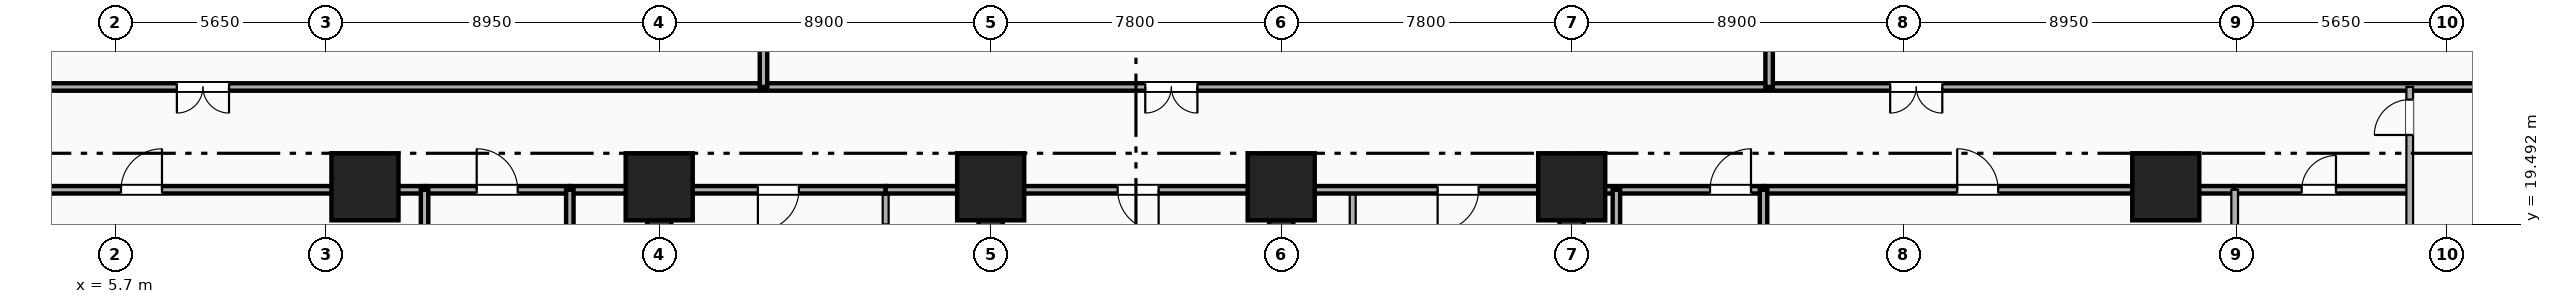
"""IFC4 building model, lengths in metres.
Left out: names, types, materials, properties, quantities, classifications, styles, units other than length and angle.
Written with IfcOpenShell. Run it as: python <this file> out.ifc"""

import sys

from ifc_helpers import new_model, si_unit, direction, frame, frame_2d, origin, origin_2d, place, context, subcontext, project, spatial, rectangle, extrude, element, fill, save


model = new_model("IFC4")
c1 = context("Model", 3, precision=1e-05, world=origin(), true_north=direction((0.0, 1.0)))
c2 = subcontext(c1, "Body", "Model", "MODEL_VIEW")
j1 = project(units=[si_unit("LENGTHUNIT", "METRE"), si_unit("PLANEANGLEUNIT", "RADIAN")], contexts=[c1])
p1 = place(None, origin())
s1 = spatial("IfcSite", under=j1, at=p1, CompositionType="ELEMENT")
p2 = place(p1, origin())
s2 = spatial("IfcBuilding", under=s1, at=p2, CompositionType="ELEMENT")
p3 = place(p2, frame((0.0, 0.0, -5.4)))
s3 = spatial("IfcBuildingStorey", under=s2, at=p3, CompositionType="ELEMENT", Elevation=-5.4)
for number, where, z_axis, x_axis in (
    (1, (20.3, 3.5, 0.0), (0.0, 0.0, 1.0), (0.0, 1.0, 0.0)),
    (2, (44.8, 3.5, 0.0), (0.0, 0.0, 1.0), (0.0, 1.0, 0.0)),
):
    element("IfcWall", number, at=place(p3, frame(where, z_axis=z_axis, x_axis=x_axis)), inside=s3, PredefinedType="SHEAR", context=c2, shape_type="SweptSolid", body=[
        extrude(rectangle(XDim=16.9, YDim=0.65, at=frame_2d((8.45, 0.0))), origin(), (0.0, 0.0, 1.0), 5.05),
    ])
p4 = place(p3, frame((29.2, 3.5, 0.0), z_axis=(0.0, 0.0, 1.0), x_axis=(0.0, 1.0, 0.0)))
e3 = element("IfcWall", 3, at=p4, inside=s3, PredefinedType="SHEAR", context=c2, shape_type="SweptSolid", body=[
    extrude(rectangle(XDim=16.9, YDim=0.65, at=frame_2d((8.45, 0.0))), origin(), (0.0, 0.0, 1.0), 5.05),
])
p5 = place(p4, frame((7.75, 0.0, 0.0), z_axis=(0.0, 0.0, 1.0), x_axis=(-1.0, 0.0, 0.0)))
e4 = element("IfcOpeningElement", 4, at=p5, cuts=e3, PredefinedType="OPENING", context=c2, shape_type="SweptSolid", body=[
    extrude(rectangle(XDim=1.1, YDim=2.15, at=frame_2d((0.55, 1.075))), frame((0.0, 0.335, 0.0), z_axis=(0.0, -1.0, 0.0), x_axis=(1.0, 0.0, 0.0)), (0.0, 0.0, 1.0), 0.67),
])
p6 = place(p3, frame((37.0, 3.5, 0.0), z_axis=(0.0, 0.0, 1.0), x_axis=(0.0, 1.0, 0.0)))
e5 = element("IfcWall", 5, at=p6, inside=s3, PredefinedType="SHEAR", context=c2, shape_type="SweptSolid", body=[
    extrude(rectangle(XDim=16.9, YDim=0.65, at=frame_2d((8.45, 0.0))), origin(), (0.0, 0.0, 1.0), 5.05),
])
p7 = place(p6, frame((6.65, 0.0, 0.0)))
e6 = element("IfcOpeningElement", 6, at=p7, cuts=e5, PredefinedType="OPENING", context=c2, shape_type="SweptSolid", body=[
    extrude(rectangle(XDim=1.1, YDim=2.15, at=frame_2d((0.55, 1.075))), frame((0.0, 0.335, 0.0), z_axis=(0.0, -1.0, 0.0), x_axis=(1.0, 0.0, 0.0)), (0.0, 0.0, 1.0), 0.67),
])
for number, where, z_axis, x_axis in (
    (7, (20.3, 20.5, 0.0), (0.0, 0.0, 1.0), (1.0, 0.0, 0.0)),
    (8, (29.2, 20.5, 0.0), (0.0, 0.0, 1.0), (1.0, 0.0, 0.0)),
    (9, (37.0, 20.5, 0.0), (0.0, 0.0, 1.0), (1.0, 0.0, 0.0)),
    (10, (44.8, 20.5, 0.0), (0.0, 0.0, 1.0), (1.0, 0.0, 0.0)),
    (11, (12.4, 20.5, 0.0), (0.0, 0.0, 1.0), (1.0, 0.0, 0.0)),
    (12, (60.75, 20.5, 0.0), (0.0, 0.0, 1.0), (1.0, 0.0, 0.0)),
):
    element("IfcColumn", number, at=place(p3, frame(where, z_axis=z_axis, x_axis=x_axis)), inside=s3, PredefinedType="COLUMN", context=c2, shape_type="SweptSolid", body=[
        extrude(rectangle(XDim=1.8, YDim=1.8, at=origin_2d()), origin(), (0.0, 0.0, 1.0), 5.05),
    ])
p8 = place(p3, frame((26.38, 17.76, 0.0), z_axis=(0.0, 0.0, 1.0), x_axis=(0.0, 1.0, 0.0)))
e13 = element("IfcWall", 13, at=p8, inside=s3, PredefinedType="PARTITIONING", context=c2, shape_type="SweptSolid", body=[
    extrude(rectangle(XDim=2.66, YDim=0.16, at=frame_2d((1.33, 0.0))), origin(), (0.0, 0.0, 1.0), 4.114),
])
p9 = place(p8, frame((0.85, 0.0, 0.0)))
e14 = element("IfcOpeningElement", 14, at=p9, cuts=e13, PredefinedType="OPENING", context=c2, shape_type="SweptSolid", body=[
    extrude(rectangle(XDim=0.88, YDim=2.08, at=frame_2d((0.44, 1.04))), frame((0.0, 0.09, 0.0), z_axis=(0.0, -1.0, 0.0), x_axis=(1.0, 0.0, 0.0)), (0.0, 0.0, 1.0), 0.18),
])
p10 = place(p3, frame((38.92, 17.76, 0.0), z_axis=(0.0, 0.0, 1.0), x_axis=(0.0, 1.0, 0.0)))
e15 = element("IfcWall", 15, at=p10, inside=s3, PredefinedType="PARTITIONING", context=c2, shape_type="SweptSolid", body=[
    extrude(rectangle(XDim=2.66, YDim=0.16, at=frame_2d((1.33, 0.0))), origin(), (0.0, 0.0, 1.0), 4.114),
])
p11 = place(p10, frame((1.14, 0.0, 0.0), z_axis=(0.0, 0.0, 1.0), x_axis=(-1.0, 0.0, 0.0)))
e16 = element("IfcOpeningElement", 16, at=p11, cuts=e15, PredefinedType="OPENING", context=c2, shape_type="SweptSolid", body=[
    extrude(rectangle(XDim=0.92, YDim=2.08, at=frame_2d((0.46, 1.04))), frame((0.0, 0.09, 0.0), z_axis=(0.0, -1.0, 0.0), x_axis=(1.0, 0.0, 0.0)), (0.0, 0.0, 1.0), 0.18),
])
p12 = place(p3, frame((20.65, 20.42, 0.0), z_axis=(0.0, 0.0, 1.0), x_axis=(1.0, 0.0, 0.0)))
e17 = element("IfcWall", 17, at=p12, inside=s3, PredefinedType="PARTITIONING", context=c2, shape_type="SweptSolid", body=[
    extrude(rectangle(XDim=5.73, YDim=0.2, at=frame_2d((2.865, 0.0))), origin(), (0.0, 0.0, 1.0), 4.114),
])
p13 = place(p12, frame((2.3, 0.0, 0.0)))
e18 = element("IfcOpeningElement", 18, at=p13, cuts=e17, PredefinedType="OPENING", context=c2, shape_type="SweptSolid", body=[
    extrude(rectangle(XDim=1.1, YDim=2.15, at=frame_2d((0.55, 1.075))), frame((0.0, 0.11, 0.0), z_axis=(0.0, -1.0, 0.0), x_axis=(1.0, 0.0, 0.0)), (0.0, 0.0, 1.0), 0.22),
])
p14 = place(p3, frame((26.38, 20.42, 0.0), z_axis=(0.0, 0.0, 1.0), x_axis=(1.0, 0.0, 0.0)))
e19 = element("IfcWall", 19, at=p14, inside=s3, PredefinedType="PARTITIONING", context=c2, shape_type="SweptSolid", body=[
    extrude(rectangle(XDim=2.82, YDim=0.2, at=frame_2d((1.41, 0.0))), origin(), (0.0, 0.0, 1.0), 4.114),
])
p15 = place(p3, frame((29.2, 20.42, 0.0), z_axis=(0.0, 0.0, 1.0), x_axis=(1.0, 0.0, 0.0)))
e20 = element("IfcWall", 20, at=p15, inside=s3, PredefinedType="PARTITIONING", context=c2, shape_type="SweptSolid", body=[
    extrude(rectangle(XDim=7.8, YDim=0.2, at=frame_2d((3.9, 0.0))), origin(), (0.0, 0.0, 1.0), 4.114),
])
p16 = place(p15, frame((3.409, 0.0, 0.0)))
e21 = element("IfcOpeningElement", 21, at=p16, cuts=e20, PredefinedType="OPENING", context=c2, shape_type="SweptSolid", body=[
    extrude(rectangle(XDim=1.1, YDim=2.15, at=frame_2d((0.55, 1.075))), frame((0.0, 0.11, 0.0), z_axis=(0.0, -1.0, 0.0), x_axis=(1.0, 0.0, 0.0)), (0.0, 0.0, 1.0), 0.22),
])
p17 = place(p3, frame((37.0, 20.42, 0.0), z_axis=(0.0, 0.0, 1.0), x_axis=(1.0, 0.0, 0.0)))
e22 = element("IfcWall", 22, at=p17, inside=s3, PredefinedType="PARTITIONING", context=c2, shape_type="SweptSolid", body=[
    extrude(rectangle(XDim=7.45, YDim=0.2, at=frame_2d((3.725, 0.0))), origin(), (0.0, 0.0, 1.0), 4.114),
])
p18 = place(p17, frame((4.2, 0.0, 0.0)))
e23 = element("IfcOpeningElement", 23, at=p18, cuts=e22, PredefinedType="OPENING", context=c2, shape_type="SweptSolid", body=[
    extrude(rectangle(XDim=1.1, YDim=2.15, at=frame_2d((0.55, 1.075))), frame((0.0, 0.11, 0.0), z_axis=(0.0, -1.0, 0.0), x_axis=(1.0, 0.0, 0.0)), (0.0, 0.0, 1.0), 0.22),
])
p19 = place(p3, frame((-4.65, 23.18, 0.0), z_axis=(0.0, 0.0, 1.0), x_axis=(1.0, 0.0, 0.0)))
e24 = element("IfcWall", 24, at=p19, inside=s3, PredefinedType="PARTITIONING", context=c2, shape_type="SweptSolid", body=[
    extrude(rectangle(XDim=82.95, YDim=0.2, at=frame_2d((41.475, 0.0))), origin(), (0.0, 0.0, 1.0), 4.18),
])
p20 = place(p19, frame((12.0, 0.0, 0.0)))
e25 = element("IfcOpeningElement", 25, at=p20, cuts=e24, PredefinedType="OPENING", context=c2, shape_type="SweptSolid", body=[
    extrude(rectangle(XDim=1.4, YDim=2.2, at=frame_2d((0.7, 1.1))), frame((0.0, 0.11, 0.0), z_axis=(0.0, -1.0, 0.0), x_axis=(1.0, 0.0, 0.0)), (0.0, 0.0, 1.0), 0.22),
])
p21 = place(p19, frame((38.0, 0.0, 0.0)))
e26 = element("IfcOpeningElement", 26, at=p21, cuts=e24, PredefinedType="OPENING", context=c2, shape_type="SweptSolid", body=[
    extrude(rectangle(XDim=1.4, YDim=2.2, at=frame_2d((0.7, 1.1))), frame((0.0, 0.11, 0.0), z_axis=(0.0, -1.0, 0.0), x_axis=(1.0, 0.0, 0.0)), (0.0, 0.0, 1.0), 0.22),
])
p22 = place(p19, frame((58.0, 0.0, 0.0)))
e27 = element("IfcOpeningElement", 27, at=p22, cuts=e24, PredefinedType="OPENING", context=c2, shape_type="SweptSolid", body=[
    extrude(rectangle(XDim=1.4, YDim=2.2, at=frame_2d((0.7, 1.1))), frame((0.0, 0.11, 0.0), z_axis=(0.0, -1.0, 0.0), x_axis=(1.0, 0.0, 0.0)), (0.0, 0.0, 1.0), 0.22),
])
p23 = place(p3, frame((-4.65, 20.42, 0.0), z_axis=(0.0, 0.0, 1.0), x_axis=(1.0, 0.0, 0.0)))
e28 = element("IfcWall", 28, at=p23, inside=s3, PredefinedType="PARTITIONING", context=c2, shape_type="SweptSolid", body=[
    extrude(rectangle(XDim=18.65, YDim=0.2, at=frame_2d((9.325, 0.0))), origin(), (0.0, 0.0, 1.0), 4.114),
])
p24 = place(p23, frame((11.6, 0.0, 0.0), z_axis=(0.0, 0.0, 1.0), x_axis=(-1.0, 0.0, 0.0)))
e29 = element("IfcOpeningElement", 29, at=p24, cuts=e28, PredefinedType="OPENING", context=c2, shape_type="SweptSolid", body=[
    extrude(rectangle(XDim=1.1, YDim=2.15, at=frame_2d((0.55, 1.075))), frame((0.0, 0.11, 0.0), z_axis=(0.0, -1.0, 0.0), x_axis=(1.0, 0.0, 0.0)), (0.0, 0.0, 1.0), 0.22),
])
p25 = place(p3, frame((14.0, 20.42, 0.0), z_axis=(0.0, 0.0, 1.0), x_axis=(1.0, 0.0, 0.0)))
e30 = element("IfcWall", 30, at=p25, inside=s3, PredefinedType="PARTITIONING", context=c2, shape_type="SweptSolid", body=[
    extrude(rectangle(XDim=3.9, YDim=0.2, at=frame_2d((1.95, 0.0))), origin(), (0.0, 0.0, 1.0), 4.114),
])
p26 = place(p25, frame((2.5, 0.0, 0.0), z_axis=(0.0, 0.0, 1.0), x_axis=(-1.0, 0.0, 0.0)))
e31 = element("IfcOpeningElement", 31, at=p26, cuts=e30, PredefinedType="OPENING", context=c2, shape_type="SweptSolid", body=[
    extrude(rectangle(XDim=1.1, YDim=2.15, at=frame_2d((0.55, 1.075))), frame((0.0, 0.11, 0.0), z_axis=(0.0, -1.0, 0.0), x_axis=(1.0, 0.0, 0.0)), (0.0, 0.0, 1.0), 0.22),
])
p27 = place(p3, frame((17.9, 20.42, 0.0), z_axis=(0.0, 0.0, 1.0), x_axis=(1.0, 0.0, 0.0)))
e32 = element("IfcWall", 32, at=p27, inside=s3, PredefinedType="PARTITIONING", context=c2, shape_type="SweptSolid", body=[
    extrude(rectangle(XDim=2.4, YDim=0.2, at=frame_2d((1.2, 0.0))), origin(), (0.0, 0.0, 1.0), 4.114),
])
p28 = place(p3, frame((44.8, 20.42, 0.0), z_axis=(0.0, 0.0, 1.0), x_axis=(1.0, 0.0, 0.0)))
e33 = element("IfcWall", 33, at=p28, inside=s3, PredefinedType="PARTITIONING", context=c2, shape_type="SweptSolid", body=[
    extrude(rectangle(XDim=5.15, YDim=0.2, at=frame_2d((2.575, 0.0))), origin(), (0.0, 0.0, 1.0), 4.114),
])
p29 = place(p28, frame((4.813, 0.0, 0.0), z_axis=(0.0, 0.0, 1.0), x_axis=(-1.0, 0.0, 0.0)))
e34 = element("IfcOpeningElement", 34, at=p29, cuts=e33, PredefinedType="OPENING", context=c2, shape_type="SweptSolid", body=[
    extrude(rectangle(XDim=1.1, YDim=2.15, at=frame_2d((0.55, 1.075))), frame((0.0, 0.11, 0.0), z_axis=(0.0, -1.0, 0.0), x_axis=(1.0, 0.0, 0.0)), (0.0, 0.0, 1.0), 0.22),
])
p30 = place(p3, frame((49.95, 20.42, 0.0), z_axis=(0.0, 0.0, 1.0), x_axis=(1.0, 0.0, 0.0)))
e35 = element("IfcWall", 35, at=p30, inside=s3, PredefinedType="PARTITIONING", context=c2, shape_type="SweptSolid", body=[
    extrude(rectangle(XDim=12.65, YDim=0.2, at=frame_2d((6.325, 0.0))), origin(), (0.0, 0.0, 1.0), 4.114),
])
p31 = place(p30, frame((6.3, 0.0, 0.0), z_axis=(0.0, 0.0, 1.0), x_axis=(-1.0, 0.0, 0.0)))
e36 = element("IfcOpeningElement", 36, at=p31, cuts=e35, PredefinedType="OPENING", context=c2, shape_type="SweptSolid", body=[
    extrude(rectangle(XDim=1.1, YDim=2.15, at=frame_2d((0.55, 1.075))), frame((0.0, 0.11, 0.0), z_axis=(0.0, -1.0, 0.0), x_axis=(1.0, 0.0, 0.0)), (0.0, 0.0, 1.0), 0.22),
])
p32 = place(p3, frame((62.6, 20.42, 0.0), z_axis=(0.0, 0.0, 1.0), x_axis=(1.0, 0.0, 0.0)))
e37 = element("IfcWall", 37, at=p32, inside=s3, PredefinedType="PARTITIONING", context=c2, shape_type="SweptSolid", body=[
    extrude(rectangle(XDim=4.7, YDim=0.2, at=frame_2d((2.35, 0.0))), origin(), (0.0, 0.0, 1.0), 5.05),
])
p33 = place(p32, frame((2.72, 0.0, 0.0), z_axis=(0.0, 0.0, 1.0), x_axis=(-1.0, 0.0, 0.0)))
e38 = element("IfcOpeningElement", 38, at=p33, cuts=e37, PredefinedType="OPENING", context=c2, shape_type="SweptSolid", body=[
    extrude(rectangle(XDim=0.92, YDim=2.08, at=frame_2d((0.46, 1.04))), frame((0.0, 0.11, 0.0), z_axis=(0.0, -1.0, 0.0), x_axis=(1.0, 0.0, 0.0)), (0.0, 0.0, 1.0), 0.22),
])
p34 = place(p3, frame((14.0, 11.4, 0.0), z_axis=(0.0, 0.0, 1.0), x_axis=(0.0, 1.0, 0.0)))
e39 = element("IfcWall", 39, at=p34, inside=s3, PredefinedType="PARTITIONING", context=c2, shape_type="SweptSolid", body=[
    extrude(rectangle(XDim=9.02, YDim=0.2, at=frame_2d((4.51, 0.0))), origin(), (0.0, 0.0, 1.0), 4.114),
])
p35 = place(p3, frame((17.9, 11.4, 0.0), z_axis=(0.0, 0.0, 1.0), x_axis=(0.0, 1.0, 0.0)))
e40 = element("IfcWall", 40, at=p35, inside=s3, PredefinedType="PARTITIONING", context=c2, shape_type="SweptSolid", body=[
    extrude(rectangle(XDim=9.02, YDim=0.2, at=frame_2d((4.51, 0.0))), origin(), (0.0, 0.0, 1.0), 4.114),
])
p36 = place(p35, frame((4.75, 0.0, 0.0), z_axis=(0.0, 0.0, 1.0), x_axis=(-1.0, 0.0, 0.0)))
e41 = element("IfcOpeningElement", 41, at=p36, cuts=e40, PredefinedType="OPENING", context=c2, shape_type="SweptSolid", body=[
    extrude(rectangle(XDim=0.95, YDim=2.15, at=frame_2d((0.475, 1.075))), frame((0.0, 0.11, 0.0), z_axis=(0.0, -1.0, 0.0), x_axis=(1.0, 0.0, 0.0)), (0.0, 0.0, 1.0), 0.22),
])
for number, where, z_axis, x_axis in (
    (42, (46.0, 11.4, 0.0), (0.0, 0.0, 1.0), (0.0, 1.0, 0.0)),
    (43, (49.95, 11.4, 0.0), (0.0, 0.0, 1.0), (0.0, 1.0, 0.0)),
):
    element("IfcWall", number, at=place(p3, frame(where, z_axis=z_axis, x_axis=x_axis)), inside=s3, PredefinedType="PARTITIONING", context=c2, shape_type="SweptSolid", body=[
        extrude(rectangle(XDim=9.02, YDim=0.2, at=frame_2d((4.51, 0.0))), origin(), (0.0, 0.0, 1.0), 4.114),
    ])
p37 = place(p3, frame((62.6, 0.7, 0.0), z_axis=(0.0, 0.0, 1.0), x_axis=(0.0, 1.0, 0.0)))
e44 = element("IfcWall", 44, at=p37, inside=s3, PredefinedType="PARTITIONING", context=c2, shape_type="SweptSolid", body=[
    extrude(rectangle(XDim=19.72, YDim=0.18, at=frame_2d((9.86, 0.0))), origin(), (0.0, 0.0, 1.0), 4.114),
])
p38 = place(p37, frame((5.15, 0.0, 0.0), z_axis=(0.0, 0.0, 1.0), x_axis=(-1.0, 0.0, 0.0)))
e45 = element("IfcOpeningElement", 45, at=p38, cuts=e44, PredefinedType="OPENING", context=c2, shape_type="SweptSolid", body=[
    extrude(rectangle(XDim=0.95, YDim=2.15, at=frame_2d((0.475, 1.075))), frame((0.0, 0.1, 0.0), z_axis=(0.0, -1.0, 0.0), x_axis=(1.0, 0.0, 0.0)), (0.0, 0.0, 1.0), 0.2),
])
p39 = place(p3, frame((67.3, 16.1, 0.0), z_axis=(0.0, 0.0, 1.0), x_axis=(0.0, 1.0, 0.0)))
e46 = element("IfcWall", 46, at=p39, inside=s3, PredefinedType="PARTITIONING", context=c2, shape_type="SweptSolid", body=[
    extrude(rectangle(XDim=7.08, YDim=0.18, at=frame_2d((3.54, 0.0))), origin(), (0.0, 0.0, 1.0), 5.05),
])
p40 = place(p39, frame((6.741, 0.0, 0.0), z_axis=(0.0, 0.0, 1.0), x_axis=(-1.0, 0.0, 0.0)))
e47 = element("IfcOpeningElement", 47, at=p40, cuts=e46, PredefinedType="OPENING", context=c2, shape_type="SweptSolid", body=[
    extrude(rectangle(XDim=0.95, YDim=2.15, at=frame_2d((0.475, 1.075))), frame((0.0, 0.1, 0.0), z_axis=(0.0, -1.0, 0.0), x_axis=(1.0, 0.0, 0.0)), (0.0, 0.0, 1.0), 0.2),
])
for number, where, z_axis, x_axis in (
    (48, (23.1, 23.18, 0.0), (0.0, 0.0, 1.0), (0.0, 1.0, 0.0)),
    (49, (50.1, 23.18, 0.0), (0.0, 0.0, 1.0), (0.0, 1.0, 0.0)),
):
    element("IfcWall", number, at=place(p3, frame(where, z_axis=z_axis, x_axis=x_axis)), inside=s3, PredefinedType="PARTITIONING", context=c2, shape_type="SweptSolid", body=[
        extrude(rectangle(XDim=28.12, YDim=0.2, at=frame_2d((14.06, 0.0))), origin(), (0.0, 0.0, 1.0), 4.114),
    ])
p41 = place(p13, origin())
e50 = element("IfcDoor", 50, at=p41, inside=s3, OperationType="SINGLE_SWING_LEFT", PredefinedType="DOOR", context=c2, shape_type="SweptSolid", body=[
    extrude(rectangle(XDim=1.1, YDim=2.15, at=frame_2d((0.55, 1.075))), frame((0.0, 0.025, 0.0), z_axis=(0.0, -1.0, 0.0), x_axis=(1.0, 0.0, 0.0)), (0.0, 0.0, 1.0), 0.05),
])
fill(e18, e50)
p42 = place(p16, origin())
e51 = element("IfcDoor", 51, at=p42, inside=s3, OperationType="SINGLE_SWING_RIGHT", PredefinedType="DOOR", context=c2, shape_type="SweptSolid", body=[
    extrude(rectangle(XDim=1.1, YDim=2.15, at=frame_2d((0.55, 1.075))), frame((0.0, 0.025, 0.0), z_axis=(0.0, -1.0, 0.0), x_axis=(1.0, 0.0, 0.0)), (0.0, 0.0, 1.0), 0.05),
])
fill(e21, e51)
p43 = place(p18, origin())
e52 = element("IfcDoor", 52, at=p43, inside=s3, OperationType="SINGLE_SWING_LEFT", PredefinedType="DOOR", context=c2, shape_type="SweptSolid", body=[
    extrude(rectangle(XDim=1.1, YDim=2.15, at=frame_2d((0.55, 1.075))), frame((0.0, 0.025, 0.0), z_axis=(0.0, -1.0, 0.0), x_axis=(1.0, 0.0, 0.0)), (0.0, 0.0, 1.0), 0.05),
])
fill(e23, e52)
p44 = place(p20, origin())
e53 = element("IfcDoor", 53, at=p44, inside=s3, OperationType="DOUBLE_DOOR_SINGLE_SWING", PredefinedType="DOOR", context=c2, shape_type="SweptSolid", body=[
    extrude(rectangle(XDim=1.4, YDim=2.2, at=frame_2d((0.7, 1.1))), frame((0.0, 0.025, 0.0), z_axis=(0.0, -1.0, 0.0), x_axis=(1.0, 0.0, 0.0)), (0.0, 0.0, 1.0), 0.05),
])
fill(e25, e53)
p45 = place(p21, origin())
e54 = element("IfcDoor", 54, at=p45, inside=s3, OperationType="DOUBLE_DOOR_SINGLE_SWING", PredefinedType="DOOR", context=c2, shape_type="SweptSolid", body=[
    extrude(rectangle(XDim=1.4, YDim=2.2, at=frame_2d((0.7, 1.1))), frame((0.0, 0.025, 0.0), z_axis=(0.0, -1.0, 0.0), x_axis=(1.0, 0.0, 0.0)), (0.0, 0.0, 1.0), 0.05),
])
fill(e26, e54)
p46 = place(p22, origin())
e55 = element("IfcDoor", 55, at=p46, inside=s3, OperationType="DOUBLE_DOOR_SINGLE_SWING", PredefinedType="DOOR", context=c2, shape_type="SweptSolid", body=[
    extrude(rectangle(XDim=1.4, YDim=2.2, at=frame_2d((0.7, 1.1))), frame((0.0, 0.025, 0.0), z_axis=(0.0, -1.0, 0.0), x_axis=(1.0, 0.0, 0.0)), (0.0, 0.0, 1.0), 0.05),
])
fill(e27, e55)
p47 = place(p24, origin())
e56 = element("IfcDoor", 56, at=p47, inside=s3, OperationType="SINGLE_SWING_RIGHT", PredefinedType="DOOR", context=c2, shape_type="SweptSolid", body=[
    extrude(rectangle(XDim=1.1, YDim=2.15, at=frame_2d((0.55, 1.075))), frame((0.0, 0.025, 0.0), z_axis=(0.0, -1.0, 0.0), x_axis=(1.0, 0.0, 0.0)), (0.0, 0.0, 1.0), 0.05),
])
fill(e29, e56)
p48 = place(p26, origin())
e57 = element("IfcDoor", 57, at=p48, inside=s3, OperationType="SINGLE_SWING_LEFT", PredefinedType="DOOR", context=c2, shape_type="SweptSolid", body=[
    extrude(rectangle(XDim=1.1, YDim=2.15, at=frame_2d((0.55, 1.075))), frame((0.0, 0.025, 0.0), z_axis=(0.0, -1.0, 0.0), x_axis=(1.0, 0.0, 0.0)), (0.0, 0.0, 1.0), 0.05),
])
fill(e31, e57)
p49 = place(p29, origin())
e58 = element("IfcDoor", 58, at=p49, inside=s3, OperationType="SINGLE_SWING_RIGHT", PredefinedType="DOOR", context=c2, shape_type="SweptSolid", body=[
    extrude(rectangle(XDim=1.1, YDim=2.15, at=frame_2d((0.55, 1.075))), frame((0.0, 0.025, 0.0), z_axis=(0.0, -1.0, 0.0), x_axis=(1.0, 0.0, 0.0)), (0.0, 0.0, 1.0), 0.05),
])
fill(e34, e58)
p50 = place(p31, origin())
e59 = element("IfcDoor", 59, at=p50, inside=s3, OperationType="SINGLE_SWING_LEFT", PredefinedType="DOOR", context=c2, shape_type="SweptSolid", body=[
    extrude(rectangle(XDim=1.1, YDim=2.15, at=frame_2d((0.55, 1.075))), frame((0.0, 0.025, 0.0), z_axis=(0.0, -1.0, 0.0), x_axis=(1.0, 0.0, 0.0)), (0.0, 0.0, 1.0), 0.05),
])
fill(e36, e59)
p51 = place(p33, origin())
e60 = element("IfcDoor", 60, at=p51, inside=s3, OperationType="SINGLE_SWING_RIGHT", PredefinedType="DOOR", context=c2, shape_type="SweptSolid", body=[
    extrude(rectangle(XDim=0.92, YDim=2.08, at=frame_2d((0.46, 1.04))), frame((0.0, 0.025, 0.0), z_axis=(0.0, -1.0, 0.0), x_axis=(1.0, 0.0, 0.0)), (0.0, 0.0, 1.0), 0.05),
])
fill(e38, e60)
p52 = place(p40, origin())
e61 = element("IfcDoor", 61, at=p52, inside=s3, OperationType="SINGLE_SWING_LEFT", PredefinedType="DOOR", context=c2, shape_type="SweptSolid", body=[
    extrude(rectangle(XDim=0.95, YDim=2.15, at=frame_2d((0.475, 1.075))), frame((0.0, 0.025, 0.0), z_axis=(0.0, -1.0, 0.0), x_axis=(1.0, 0.0, 0.0)), (0.0, 0.0, 1.0), 0.05),
])
fill(e47, e61)
save(model, sys.argv[1])
